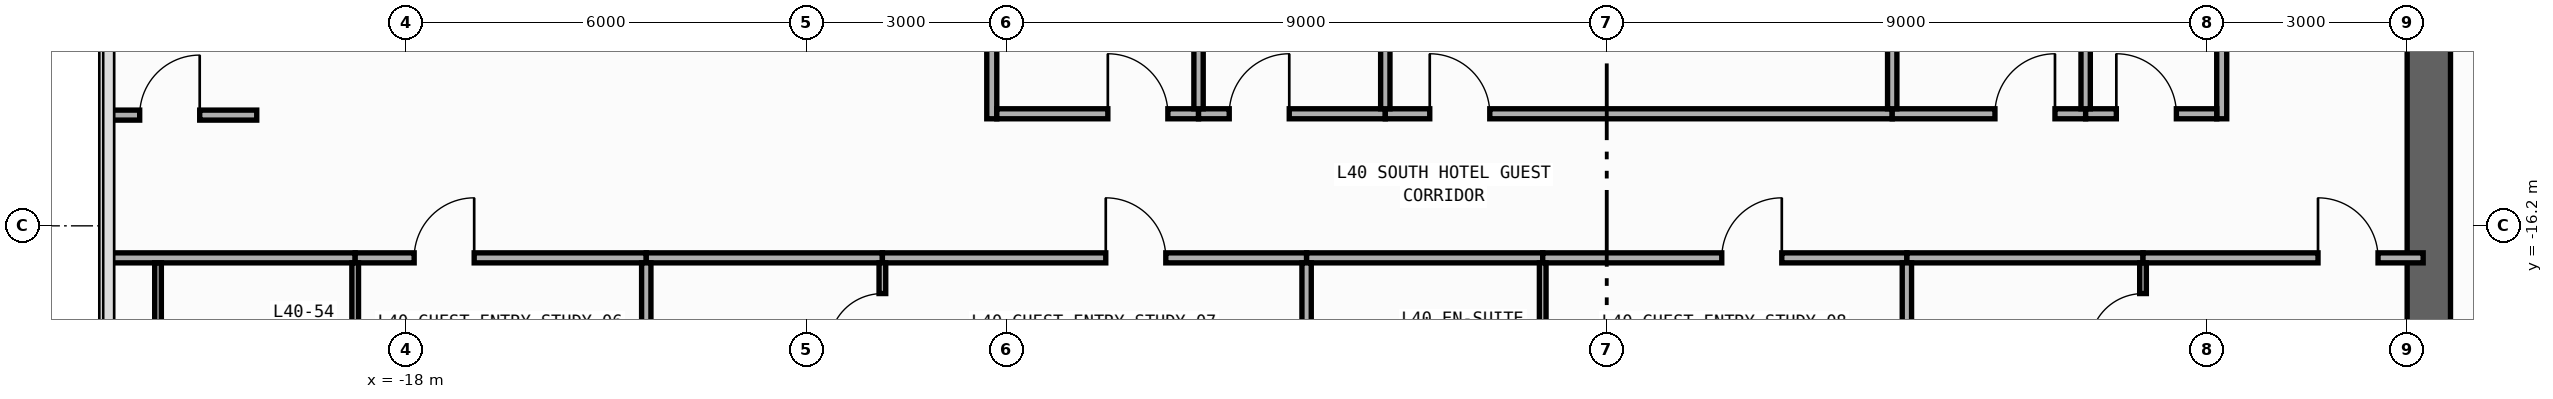
"""IFC4 building model, lengths in metres.
Left out: names, types, materials, properties, quantities, classifications, styles, units other than length and angle.
Written with IfcOpenShell. Run it as: python <this file> out.ifc"""

import sys

from ifc_helpers import new_model, si_unit, direction, frame, frame_2d, origin, place, context, subcontext, project, spatial, rectangle, extrude, element, fill, save


model = new_model("IFC4")
c1 = context("Model", 3, precision=1e-05, world=origin(), true_north=direction((0.0, 1.0)))
c2 = subcontext(c1, "Body", "Model", "MODEL_VIEW")
j1 = project(units=[si_unit("LENGTHUNIT", "METRE"), si_unit("PLANEANGLEUNIT", "RADIAN")], contexts=[c1])
p1 = place(None, origin())
s1 = spatial("IfcSite", under=j1, at=p1, CompositionType="ELEMENT")
p2 = place(p1, origin())
s2 = spatial("IfcBuilding", under=s1, at=p2, CompositionType="ELEMENT")
p3 = place(p2, frame((0.0, 0.0, 176.4)))
s3 = spatial("IfcBuildingStorey", under=s2, at=p3, CompositionType="ELEMENT", Elevation=176.4)
p4 = place(p3, frame((12.325, -19.8, 0.0), z_axis=(0.0, 0.0, 1.0), x_axis=(0.0, 1.0, 0.0)))
e1 = element("IfcWall", 1, at=p4, inside=s3, PredefinedType="SHEAR", context=c2, shape_type="SweptSolid", body=[
    extrude(rectangle(XDim=27.0, YDim=0.65, at=frame_2d((13.5, 0.0))), origin(), (0.0, 0.0, 1.0), 3.54),
])
p5 = place(p4, frame((23.05, 0.0, 0.0)))
e2 = element("IfcOpeningElement", 2, at=p5, cuts=e1, PredefinedType="OPENING", context=c2, shape_type="SweptSolid", body=[
    extrude(rectangle(XDim=1.1, YDim=2.2, at=frame_2d((0.55, 1.1))), frame((0.0, 0.335, 0.0), z_axis=(0.0, -1.0, 0.0), x_axis=(1.0, 0.0, 0.0)), (0.0, 0.0, 1.0), 0.67),
])
p6 = place(p4, frame((19.85, 0.0, 0.0)))
e3 = element("IfcOpeningElement", 3, at=p6, cuts=e1, PredefinedType="OPENING", context=c2, shape_type="SweptSolid", body=[
    extrude(rectangle(XDim=1.1, YDim=2.2, at=frame_2d((0.55, 1.1))), frame((0.0, 0.335, 0.0), z_axis=(0.0, -1.0, 0.0), x_axis=(1.0, 0.0, 0.0)), (0.0, 0.0, 1.0), 0.67),
])
p7 = place(p4, frame((16.65, 0.0, 0.0)))
e4 = element("IfcOpeningElement", 4, at=p7, cuts=e1, PredefinedType="OPENING", context=c2, shape_type="SweptSolid", body=[
    extrude(rectangle(XDim=1.1, YDim=2.2, at=frame_2d((0.55, 1.1))), frame((0.0, 0.335, 0.0), z_axis=(0.0, -1.0, 0.0), x_axis=(1.0, 0.0, 0.0)), (0.0, 0.0, 1.0), 0.67),
])
p8 = place(p4, frame((7.175, 0.0, 0.0)))
e5 = element("IfcOpeningElement", 5, at=p8, cuts=e1, PredefinedType="OPENING", context=c2, shape_type="SweptSolid", body=[
    extrude(rectangle(XDim=0.85, YDim=2.1, at=frame_2d((0.425, 1.05))), frame((0.0, 0.335, 0.0), z_axis=(0.0, -1.0, 0.0), x_axis=(1.0, 0.0, 0.0)), (0.0, 0.0, 1.0), 0.67),
])
p9 = place(p4, frame((10.375, 0.0, 0.0)))
e6 = element("IfcOpeningElement", 6, at=p9, cuts=e1, PredefinedType="OPENING", context=c2, shape_type="SweptSolid", body=[
    extrude(rectangle(XDim=0.85, YDim=2.1, at=frame_2d((0.425, 1.05))), frame((0.0, 0.335, 0.0), z_axis=(0.0, -1.0, 0.0), x_axis=(1.0, 0.0, 0.0)), (0.0, 0.0, 1.0), 0.67),
])
p10 = place(p4, frame((12.725, 0.0, 0.0)))
e7 = element("IfcOpeningElement", 7, at=p10, cuts=e1, PredefinedType="OPENING", context=c2, shape_type="SweptSolid", body=[
    extrude(rectangle(XDim=1.15, YDim=2.2, at=frame_2d((0.575, 1.1))), frame((0.0, 0.335, 0.0), z_axis=(0.0, -1.0, 0.0), x_axis=(1.0, 0.0, 0.0)), (0.0, 0.0, 1.0), 0.67),
])
p11 = place(p4, frame((25.125, 0.0, 0.0)))
e8 = element("IfcOpeningElement", 8, at=p11, cuts=e1, PredefinedType="OPENING", context=c2, shape_type="SweptSolid", body=[
    extrude(rectangle(XDim=0.85, YDim=2.1, at=frame_2d((0.425, 1.05))), frame((0.0, 0.335, 0.0), z_axis=(0.0, -1.0, 0.0), x_axis=(1.0, 0.0, 0.0)), (0.0, 0.0, 1.0), 0.67),
])
p12 = place(p3, frame((-9.22, -14.595, 0.0), z_axis=(0.0, 0.0, 1.0), x_axis=(0.0, 1.0, 0.0)))
e9 = element("IfcWall", 9, at=p12, inside=s3, PredefinedType="PARTITIONING", context=c2, shape_type="SweptSolid", body=[
    extrude(rectangle(XDim=15.095, YDim=0.15, at=frame_2d((7.547, 0.0))), origin(), (0.0, 0.0, 1.0), 2.952),
])
p13 = place(p12, frame((8.707, 0.0, 0.0)))
e10 = element("IfcOpeningElement", 10, at=p13, cuts=e9, PredefinedType="OPENING", context=c2, shape_type="SweptSolid", body=[
    extrude(rectangle(XDim=0.9, YDim=2.15, at=frame_2d((0.45, 1.075))), frame((0.0, 0.085, 0.0), z_axis=(0.0, -1.0, 0.0), x_axis=(1.0, 0.0, 0.0)), (0.0, 0.0, 1.0), 0.17),
])
p14 = place(p3, frame((9.22, -14.595, 0.0), z_axis=(0.0, 0.0, 1.0), x_axis=(0.0, 1.0, 0.0)))
e11 = element("IfcWall", 11, at=p14, inside=s3, PredefinedType="PARTITIONING", context=c2, shape_type="SweptSolid", body=[
    extrude(rectangle(XDim=15.095, YDim=0.15, at=frame_2d((7.547, 0.0))), origin(), (0.0, 0.0, 1.0), 2.952),
])
p15 = place(p14, frame((8.707, 0.0, 0.0)))
e12 = element("IfcOpeningElement", 12, at=p15, cuts=e11, PredefinedType="OPENING", context=c2, shape_type="SweptSolid", body=[
    extrude(rectangle(XDim=0.9, YDim=2.15, at=frame_2d((0.45, 1.075))), frame((0.0, 0.085, 0.0), z_axis=(0.0, -1.0, 0.0), x_axis=(1.0, 0.0, 0.0)), (0.0, 0.0, 1.0), 0.17),
])
p16 = place(p3, frame((-9.145, -14.52, 0.0), z_axis=(0.0, 0.0, 1.0), x_axis=(1.0, 0.0, 0.0)))
e13 = element("IfcWall", 13, at=p16, inside=s3, PredefinedType="PARTITIONING", context=c2, shape_type="SweptSolid", body=[
    extrude(rectangle(XDim=3.025, YDim=0.15, at=frame_2d((1.512, 0.0))), origin(), (0.0, 0.0, 1.0), 3.54),
])
p17 = place(p16, frame((1.665, 0.0, 0.0)))
e14 = element("IfcOpeningElement", 14, at=p17, cuts=e13, PredefinedType="OPENING", context=c2, shape_type="SweptSolid", body=[
    extrude(rectangle(XDim=0.9, YDim=2.15, at=frame_2d((0.45, 1.075))), frame((0.0, 0.085, 0.0), z_axis=(0.0, -1.0, 0.0), x_axis=(1.0, 0.0, 0.0)), (0.0, 0.0, 1.0), 0.17),
])
p18 = place(p3, frame((-6.12, -14.52, 0.0), z_axis=(0.0, 0.0, 1.0), x_axis=(1.0, 0.0, 0.0)))
e15 = element("IfcWall", 15, at=p18, inside=s3, PredefinedType="PARTITIONING", context=c2, shape_type="SweptSolid", body=[
    extrude(rectangle(XDim=2.8, YDim=0.15, at=frame_2d((1.4, 0.0))), origin(), (0.0, 0.0, 1.0), 3.54),
])
p19 = place(p18, frame((0.46, 0.0, 0.0)))
e16 = element("IfcOpeningElement", 16, at=p19, cuts=e15, PredefinedType="OPENING", context=c2, shape_type="SweptSolid", body=[
    extrude(rectangle(XDim=0.9, YDim=2.15, at=frame_2d((0.45, 1.075))), frame((0.0, 0.085, 0.0), z_axis=(0.0, -1.0, 0.0), x_axis=(1.0, 0.0, 0.0)), (0.0, 0.0, 1.0), 0.17),
])
p20 = place(p3, frame((-3.32, -14.52, 0.0), z_axis=(0.0, 0.0, 1.0), x_axis=(1.0, 0.0, 0.0)))
e17 = element("IfcWall", 17, at=p20, inside=s3, PredefinedType="PARTITIONING", context=c2, shape_type="SweptSolid", body=[
    extrude(rectangle(XDim=7.6, YDim=0.15, at=frame_2d((3.8, 0.0))), origin(), (0.0, 0.0, 1.0), 3.54),
])
p21 = place(p20, frame((0.667, 0.0, 0.0)))
e18 = element("IfcOpeningElement", 18, at=p21, cuts=e17, PredefinedType="OPENING", context=c2, shape_type="SweptSolid", body=[
    extrude(rectangle(XDim=0.9, YDim=2.15, at=frame_2d((0.45, 1.075))), frame((0.0, 0.085, 0.0), z_axis=(0.0, -1.0, 0.0), x_axis=(1.0, 0.0, 0.0)), (0.0, 0.0, 1.0), 0.17),
])
p22 = place(p3, frame((4.28, -14.52, 0.0), z_axis=(0.0, 0.0, 1.0), x_axis=(1.0, 0.0, 0.0)))
e19 = element("IfcWall", 19, at=p22, inside=s3, PredefinedType="PARTITIONING", context=c2, shape_type="SweptSolid", body=[
    extrude(rectangle(XDim=2.9, YDim=0.15, at=frame_2d((1.45, 0.0))), origin(), (0.0, 0.0, 1.0), 3.54),
])
p23 = place(p22, frame((1.54, 0.0, 0.0)))
e20 = element("IfcOpeningElement", 20, at=p23, cuts=e19, PredefinedType="OPENING", context=c2, shape_type="SweptSolid", body=[
    extrude(rectangle(XDim=0.9, YDim=2.15, at=frame_2d((0.45, 1.075))), frame((0.0, 0.085, 0.0), z_axis=(0.0, -1.0, 0.0), x_axis=(1.0, 0.0, 0.0)), (0.0, 0.0, 1.0), 0.17),
])
p24 = place(p3, frame((7.18, -14.52, 0.0), z_axis=(0.0, 0.0, 1.0), x_axis=(1.0, 0.0, 0.0)))
e21 = element("IfcWall", 21, at=p24, inside=s3, PredefinedType="PARTITIONING", context=c2, shape_type="SweptSolid", body=[
    extrude(rectangle(XDim=1.965, YDim=0.15, at=frame_2d((0.982, 0.0))), origin(), (0.0, 0.0, 1.0), 3.54),
])
p25 = place(p24, frame((0.46, 0.0, 0.0)))
e22 = element("IfcOpeningElement", 22, at=p25, cuts=e21, PredefinedType="OPENING", context=c2, shape_type="SweptSolid", body=[
    extrude(rectangle(XDim=0.9, YDim=2.15, at=frame_2d((0.45, 1.075))), frame((0.0, 0.085, 0.0), z_axis=(0.0, -1.0, 0.0), x_axis=(1.0, 0.0, 0.0)), (0.0, 0.0, 1.0), 0.17),
])
p26 = place(p3, frame((-22.455, -16.68, 0.0), z_axis=(0.0, 0.0, 1.0), x_axis=(1.0, 0.0, 0.0)))
e23 = element("IfcWall", 23, at=p26, inside=s3, PredefinedType="PARTITIONING", context=c2, shape_type="SweptSolid", body=[
    extrude(rectangle(XDim=3.691, YDim=0.15, at=frame_2d((1.846, 0.0))), origin(), (0.0, 0.0, 1.0), 3.54),
])
p27 = place(p3, frame((-18.764, -16.68, 0.0), z_axis=(0.0, 0.0, 1.0), x_axis=(1.0, 0.0, 0.0)))
e24 = element("IfcWall", 24, at=p27, inside=s3, PredefinedType="PARTITIONING", context=c2, shape_type="SweptSolid", body=[
    extrude(rectangle(XDim=4.364, YDim=0.15, at=frame_2d((2.182, 0.0))), origin(), (0.0, 0.0, 1.0), 3.54),
])
p28 = place(p27, frame((0.884, 0.0, 0.0)))
e25 = element("IfcOpeningElement", 25, at=p28, cuts=e24, PredefinedType="OPENING", context=c2, shape_type="SweptSolid", body=[
    extrude(rectangle(XDim=0.9, YDim=2.15, at=frame_2d((0.45, 1.075))), frame((0.0, 0.085, 0.0), z_axis=(0.0, -1.0, 0.0), x_axis=(1.0, 0.0, 0.0)), (0.0, 0.0, 1.0), 0.17),
])
p29 = place(p3, frame((-14.4, -16.68, 0.0), z_axis=(0.0, 0.0, 1.0), x_axis=(1.0, 0.0, 0.0)))
e26 = element("IfcWall", 26, at=p29, inside=s3, PredefinedType="PARTITIONING", context=c2, shape_type="SweptSolid", body=[
    extrude(rectangle(XDim=3.54, YDim=0.15, at=frame_2d((1.77, 0.0))), origin(), (0.0, 0.0, 1.0), 3.54),
])
p30 = place(p3, frame((-10.86, -16.68, 0.0), z_axis=(0.0, 0.0, 1.0), x_axis=(1.0, 0.0, 0.0)))
e27 = element("IfcWall", 27, at=p30, inside=s3, PredefinedType="PARTITIONING", context=c2, shape_type="SweptSolid", body=[
    extrude(rectangle(XDim=6.36, YDim=0.15, at=frame_2d((3.18, 0.0))), origin(), (0.0, 0.0, 1.0), 3.54),
])
p31 = place(p30, frame((3.349, 0.0, 0.0)))
e28 = element("IfcOpeningElement", 28, at=p31, cuts=e27, PredefinedType="OPENING", context=c2, shape_type="SweptSolid", body=[
    extrude(rectangle(XDim=0.9, YDim=2.15, at=frame_2d((0.45, 1.075))), frame((0.0, 0.085, 0.0), z_axis=(0.0, -1.0, 0.0), x_axis=(1.0, 0.0, 0.0)), (0.0, 0.0, 1.0), 0.17),
])
p32 = place(p3, frame((-4.5, -16.68, 0.0), z_axis=(0.0, 0.0, 1.0), x_axis=(1.0, 0.0, 0.0)))
e29 = element("IfcWall", 29, at=p32, inside=s3, PredefinedType="PARTITIONING", context=c2, shape_type="SweptSolid", body=[
    extrude(rectangle(XDim=3.54, YDim=0.15, at=frame_2d((1.77, 0.0))), origin(), (0.0, 0.0, 1.0), 3.54),
])
p33 = place(p3, frame((-0.96, -16.68, 0.0), z_axis=(0.0, 0.0, 1.0), x_axis=(1.0, 0.0, 0.0)))
e30 = element("IfcWall", 30, at=p33, inside=s3, PredefinedType="PARTITIONING", context=c2, shape_type="SweptSolid", body=[
    extrude(rectangle(XDim=5.46, YDim=0.15, at=frame_2d((2.73, 0.0))), origin(), (0.0, 0.0, 1.0), 3.54),
])
p34 = place(p33, frame((2.684, 0.0, 0.0)))
e31 = element("IfcOpeningElement", 31, at=p34, cuts=e30, PredefinedType="OPENING", context=c2, shape_type="SweptSolid", body=[
    extrude(rectangle(XDim=0.9, YDim=2.15, at=frame_2d((0.45, 1.075))), frame((0.0, 0.085, 0.0), z_axis=(0.0, -1.0, 0.0), x_axis=(1.0, 0.0, 0.0)), (0.0, 0.0, 1.0), 0.17),
])
p35 = place(p3, frame((4.5, -16.68, 0.0), z_axis=(0.0, 0.0, 1.0), x_axis=(1.0, 0.0, 0.0)))
e32 = element("IfcWall", 32, at=p35, inside=s3, PredefinedType="PARTITIONING", context=c2, shape_type="SweptSolid", body=[
    extrude(rectangle(XDim=3.54, YDim=0.15, at=frame_2d((1.77, 0.0))), origin(), (0.0, 0.0, 1.0), 3.54),
])
p36 = place(p3, frame((8.04, -16.68, 0.0), z_axis=(0.0, 0.0, 1.0), x_axis=(1.0, 0.0, 0.0)))
e33 = element("IfcWall", 33, at=p36, inside=s3, PredefinedType="PARTITIONING", context=c2, shape_type="SweptSolid", body=[
    extrude(rectangle(XDim=4.2, YDim=0.15, at=frame_2d((2.1, 0.0))), origin(), (0.0, 0.0, 1.0), 3.54),
])
p37 = place(p36, frame((2.624, 0.0, 0.0)))
e34 = element("IfcOpeningElement", 34, at=p37, cuts=e33, PredefinedType="OPENING", context=c2, shape_type="SweptSolid", body=[
    extrude(rectangle(XDim=0.9, YDim=2.15, at=frame_2d((0.45, 1.075))), frame((0.0, 0.085, 0.0), z_axis=(0.0, -1.0, 0.0), x_axis=(1.0, 0.0, 0.0)), (0.0, 0.0, 1.0), 0.17),
])
p38 = place(p3, frame((-22.455, -14.54, 0.0), z_axis=(0.0, 0.0, 1.0), x_axis=(1.0, 0.0, 0.0)))
e35 = element("IfcWall", 35, at=p38, inside=s3, PredefinedType="PARTITIONING", context=c2, shape_type="SweptSolid", body=[
    extrude(rectangle(XDim=2.215, YDim=0.15, at=frame_2d((1.107, 0.0))), origin(), (0.0, 0.0, 1.0), 3.54),
])
p39 = place(p38, frame((0.46, 0.0, 0.0)))
e36 = element("IfcOpeningElement", 36, at=p39, cuts=e35, PredefinedType="OPENING", context=c2, shape_type="SweptSolid", body=[
    extrude(rectangle(XDim=0.9, YDim=2.15, at=frame_2d((0.45, 1.075))), frame((0.0, 0.085, 0.0), z_axis=(0.0, -1.0, 0.0), x_axis=(1.0, 0.0, 0.0)), (0.0, 0.0, 1.0), 0.17),
])
for number, where, z_axis, x_axis in (
    (37, (-6.12, -14.445, 0.0), (0.0, 0.0, 1.0), (0.0, 1.0, 0.0)),
    (38, (-3.32, -14.445, 0.0), (0.0, 0.0, 1.0), (0.0, 1.0, 0.0)),
):
    element("IfcWall", number, at=place(p3, frame(where, z_axis=z_axis, x_axis=x_axis)), inside=s3, PredefinedType="PARTITIONING", context=c2, shape_type="SweptSolid", body=[
        extrude(rectangle(XDim=14.875, YDim=0.14, at=frame_2d((7.438, 0.0))), origin(), (0.0, 0.0, 1.0), 3.54),
    ])
for number, where, z_axis, x_axis in (
    (39, (4.28, -14.445, 0.0), (0.0, 0.0, 1.0), (0.0, 1.0, 0.0)),
    (40, (7.18, -14.445, 0.0), (0.0, 0.0, 1.0), (0.0, 1.0, 0.0)),
):
    element("IfcWall", number, at=place(p3, frame(where, z_axis=z_axis, x_axis=x_axis)), inside=s3, PredefinedType="PARTITIONING", context=c2, shape_type="SweptSolid", body=[
        extrude(rectangle(XDim=2.885, YDim=0.14, at=frame_2d((1.442, 0.0))), origin(), (0.0, 0.0, 1.0), 3.54),
    ])
p40 = place(p3, frame((-18.764, -19.72, 0.0), z_axis=(0.0, 0.0, 1.0), x_axis=(0.0, 1.0, 0.0)))
e41 = element("IfcWall", 41, at=p40, inside=s3, PredefinedType="PARTITIONING", context=c2, shape_type="SweptSolid", body=[
    extrude(rectangle(XDim=2.965, YDim=0.1, at=frame_2d((1.482, 0.0))), origin(), (0.0, 0.0, 1.0), 3.54),
])
p41 = place(p3, frame((-14.4, -19.77, 0.0), z_axis=(0.0, 0.0, 1.0), x_axis=(0.0, 1.0, 0.0)))
e42 = element("IfcWall", 42, at=p41, inside=s3, PredefinedType="PARTITIONING", context=c2, shape_type="SweptSolid", body=[
    extrude(rectangle(XDim=3.015, YDim=0.14, at=frame_2d((1.508, 0.0))), origin(), (0.0, 0.0, 1.0), 2.952),
])
p42 = place(p3, frame((-10.86, -19.72, 0.0), z_axis=(0.0, 0.0, 1.0), x_axis=(0.0, 1.0, 0.0)))
e43 = element("IfcWall", 43, at=p42, inside=s3, PredefinedType="PARTITIONING", context=c2, shape_type="SweptSolid", body=[
    extrude(rectangle(XDim=2.965, YDim=0.1, at=frame_2d((1.482, 0.0))), origin(), (0.0, 0.0, 1.0), 3.54),
])
p43 = place(p42, frame((1.705, 0.0, 0.0)))
e44 = element("IfcOpeningElement", 44, at=p43, cuts=e43, PredefinedType="OPENING", context=c2, shape_type="SweptSolid", body=[
    extrude(rectangle(XDim=0.8, YDim=2.1, at=frame_2d((0.4, 1.05))), frame((0.0, 0.06, 0.0), z_axis=(0.0, -1.0, 0.0), x_axis=(1.0, 0.0, 0.0)), (0.0, 0.0, 1.0), 0.12),
])
p44 = place(p3, frame((-4.5, -19.77, 0.0), z_axis=(0.0, 0.0, 1.0), x_axis=(0.0, 1.0, 0.0)))
e45 = element("IfcWall", 45, at=p44, inside=s3, PredefinedType="PARTITIONING", context=c2, shape_type="SweptSolid", body=[
    extrude(rectangle(XDim=3.015, YDim=0.14, at=frame_2d((1.508, 0.0))), origin(), (0.0, 0.0, 1.0), 3.54),
])
p45 = place(p3, frame((-0.96, -19.72, 0.0), z_axis=(0.0, 0.0, 1.0), x_axis=(0.0, 1.0, 0.0)))
e46 = element("IfcWall", 46, at=p45, inside=s3, PredefinedType="PARTITIONING", context=c2, shape_type="SweptSolid", body=[
    extrude(rectangle(XDim=2.965, YDim=0.1, at=frame_2d((1.482, 0.0))), origin(), (0.0, 0.0, 1.0), 3.54),
])
p46 = place(p3, frame((4.5, -19.77, 0.0), z_axis=(0.0, 0.0, 1.0), x_axis=(0.0, 1.0, 0.0)))
e47 = element("IfcWall", 47, at=p46, inside=s3, PredefinedType="PARTITIONING", context=c2, shape_type="SweptSolid", body=[
    extrude(rectangle(XDim=3.015, YDim=0.14, at=frame_2d((1.508, 0.0))), origin(), (0.0, 0.0, 1.0), 3.54),
])
p47 = place(p3, frame((8.04, -19.72, 0.0), z_axis=(0.0, 0.0, 1.0), x_axis=(0.0, 1.0, 0.0)))
e48 = element("IfcWall", 48, at=p47, inside=s3, PredefinedType="PARTITIONING", context=c2, shape_type="SweptSolid", body=[
    extrude(rectangle(XDim=2.965, YDim=0.1, at=frame_2d((1.482, 0.0))), origin(), (0.0, 0.0, 1.0), 3.54),
])
p48 = place(p47, frame((1.705, 0.0, 0.0)))
e49 = element("IfcOpeningElement", 49, at=p48, cuts=e48, PredefinedType="OPENING", context=c2, shape_type="SweptSolid", body=[
    extrude(rectangle(XDim=0.8, YDim=2.1, at=frame_2d((0.4, 1.05))), frame((0.0, 0.06, 0.0), z_axis=(0.0, -1.0, 0.0), x_axis=(1.0, 0.0, 0.0)), (0.0, 0.0, 1.0), 0.12),
])
p49 = place(p3, frame((-21.72, -18.77, 0.0), z_axis=(0.0, 0.0, 1.0), x_axis=(0.0, 1.0, 0.0)))
e50 = element("IfcWall", 50, at=p49, inside=s3, PredefinedType="PARTITIONING", context=c2, shape_type="SweptSolid", body=[
    extrude(rectangle(XDim=2.015, YDim=0.1, at=frame_2d((1.008, 0.0))), origin(), (0.0, 0.0, 1.0), 3.54),
])
p50 = place(p17, origin())
e51 = element("IfcDoor", 51, at=p50, inside=s3, OperationType="SINGLE_SWING_LEFT", PredefinedType="DOOR", context=c2, shape_type="SweptSolid", body=[
    extrude(rectangle(XDim=0.9, YDim=2.15, at=frame_2d((0.45, 1.075))), frame((0.0, 0.025, 0.0), z_axis=(0.0, -1.0, 0.0), x_axis=(1.0, 0.0, 0.0)), (0.0, 0.0, 1.0), 0.05),
])
fill(e14, e51)
p51 = place(p19, origin())
e52 = element("IfcDoor", 52, at=p51, inside=s3, OperationType="SINGLE_SWING_RIGHT", PredefinedType="DOOR", context=c2, shape_type="SweptSolid", body=[
    extrude(rectangle(XDim=0.9, YDim=2.15, at=frame_2d((0.45, 1.075))), frame((0.0, 0.025, 0.0), z_axis=(0.0, -1.0, 0.0), x_axis=(1.0, 0.0, 0.0)), (0.0, 0.0, 1.0), 0.05),
])
fill(e16, e52)
p52 = place(p21, origin())
e53 = element("IfcDoor", 53, at=p52, inside=s3, OperationType="SINGLE_SWING_LEFT", PredefinedType="DOOR", context=c2, shape_type="SweptSolid", body=[
    extrude(rectangle(XDim=0.9, YDim=2.15, at=frame_2d((0.45, 1.075))), frame((0.0, 0.025, 0.0), z_axis=(0.0, -1.0, 0.0), x_axis=(1.0, 0.0, 0.0)), (0.0, 0.0, 1.0), 0.05),
])
fill(e18, e53)
p53 = place(p23, origin())
e54 = element("IfcDoor", 54, at=p53, inside=s3, OperationType="SINGLE_SWING_RIGHT", PredefinedType="DOOR", context=c2, shape_type="SweptSolid", body=[
    extrude(rectangle(XDim=0.9, YDim=2.15, at=frame_2d((0.45, 1.075))), frame((0.0, 0.025, 0.0), z_axis=(0.0, -1.0, 0.0), x_axis=(1.0, 0.0, 0.0)), (0.0, 0.0, 1.0), 0.05),
])
fill(e20, e54)
p54 = place(p25, origin())
e55 = element("IfcDoor", 55, at=p54, inside=s3, OperationType="SINGLE_SWING_LEFT", PredefinedType="DOOR", context=c2, shape_type="SweptSolid", body=[
    extrude(rectangle(XDim=0.9, YDim=2.15, at=frame_2d((0.45, 1.075))), frame((0.0, 0.025, 0.0), z_axis=(0.0, -1.0, 0.0), x_axis=(1.0, 0.0, 0.0)), (0.0, 0.0, 1.0), 0.05),
])
fill(e22, e55)
p55 = place(p28, origin())
e56 = element("IfcDoor", 56, at=p55, inside=s3, OperationType="SINGLE_SWING_RIGHT", PredefinedType="DOOR", context=c2, shape_type="SweptSolid", body=[
    extrude(rectangle(XDim=0.9, YDim=2.15, at=frame_2d((0.45, 1.075))), frame((0.0, 0.025, 0.0), z_axis=(0.0, -1.0, 0.0), x_axis=(1.0, 0.0, 0.0)), (0.0, 0.0, 1.0), 0.05),
])
fill(e25, e56)
p56 = place(p31, origin())
e57 = element("IfcDoor", 57, at=p56, inside=s3, OperationType="SINGLE_SWING_LEFT", PredefinedType="DOOR", context=c2, shape_type="SweptSolid", body=[
    extrude(rectangle(XDim=0.9, YDim=2.15, at=frame_2d((0.45, 1.075))), frame((0.0, 0.025, 0.0), z_axis=(0.0, -1.0, 0.0), x_axis=(1.0, 0.0, 0.0)), (0.0, 0.0, 1.0), 0.05),
])
fill(e28, e57)
p57 = place(p34, origin())
e58 = element("IfcDoor", 58, at=p57, inside=s3, OperationType="SINGLE_SWING_RIGHT", PredefinedType="DOOR", context=c2, shape_type="SweptSolid", body=[
    extrude(rectangle(XDim=0.9, YDim=2.15, at=frame_2d((0.45, 1.075))), frame((0.0, 0.025, 0.0), z_axis=(0.0, -1.0, 0.0), x_axis=(1.0, 0.0, 0.0)), (0.0, 0.0, 1.0), 0.05),
])
fill(e31, e58)
p58 = place(p37, origin())
e59 = element("IfcDoor", 59, at=p58, inside=s3, OperationType="SINGLE_SWING_LEFT", PredefinedType="DOOR", context=c2, shape_type="SweptSolid", body=[
    extrude(rectangle(XDim=0.9, YDim=2.15, at=frame_2d((0.45, 1.075))), frame((0.0, 0.025, 0.0), z_axis=(0.0, -1.0, 0.0), x_axis=(1.0, 0.0, 0.0)), (0.0, 0.0, 1.0), 0.05),
])
fill(e34, e59)
p59 = place(p39, origin())
e60 = element("IfcDoor", 60, at=p59, inside=s3, OperationType="SINGLE_SWING_RIGHT", PredefinedType="DOOR", context=c2, shape_type="SweptSolid", body=[
    extrude(rectangle(XDim=0.9, YDim=2.15, at=frame_2d((0.45, 1.075))), frame((0.0, 0.025, 0.0), z_axis=(0.0, -1.0, 0.0), x_axis=(1.0, 0.0, 0.0)), (0.0, 0.0, 1.0), 0.05),
])
fill(e36, e60)
p60 = place(p43, origin())
e61 = element("IfcDoor", 61, at=p60, inside=s3, OperationType="SINGLE_SWING_LEFT", PredefinedType="DOOR", context=c2, shape_type="SweptSolid", body=[
    extrude(rectangle(XDim=0.8, YDim=2.1, at=frame_2d((0.4, 1.05))), frame((0.0, 0.025, 0.0), z_axis=(0.0, -1.0, 0.0), x_axis=(1.0, 0.0, 0.0)), (0.0, 0.0, 1.0), 0.05),
])
fill(e44, e61)
p61 = place(p48, origin())
e62 = element("IfcDoor", 62, at=p61, inside=s3, OperationType="SINGLE_SWING_LEFT", PredefinedType="DOOR", context=c2, shape_type="SweptSolid", body=[
    extrude(rectangle(XDim=0.8, YDim=2.1, at=frame_2d((0.4, 1.05))), frame((0.0, 0.025, 0.0), z_axis=(0.0, -1.0, 0.0), x_axis=(1.0, 0.0, 0.0)), (0.0, 0.0, 1.0), 0.05),
])
fill(e49, e62)
save(model, sys.argv[1])
